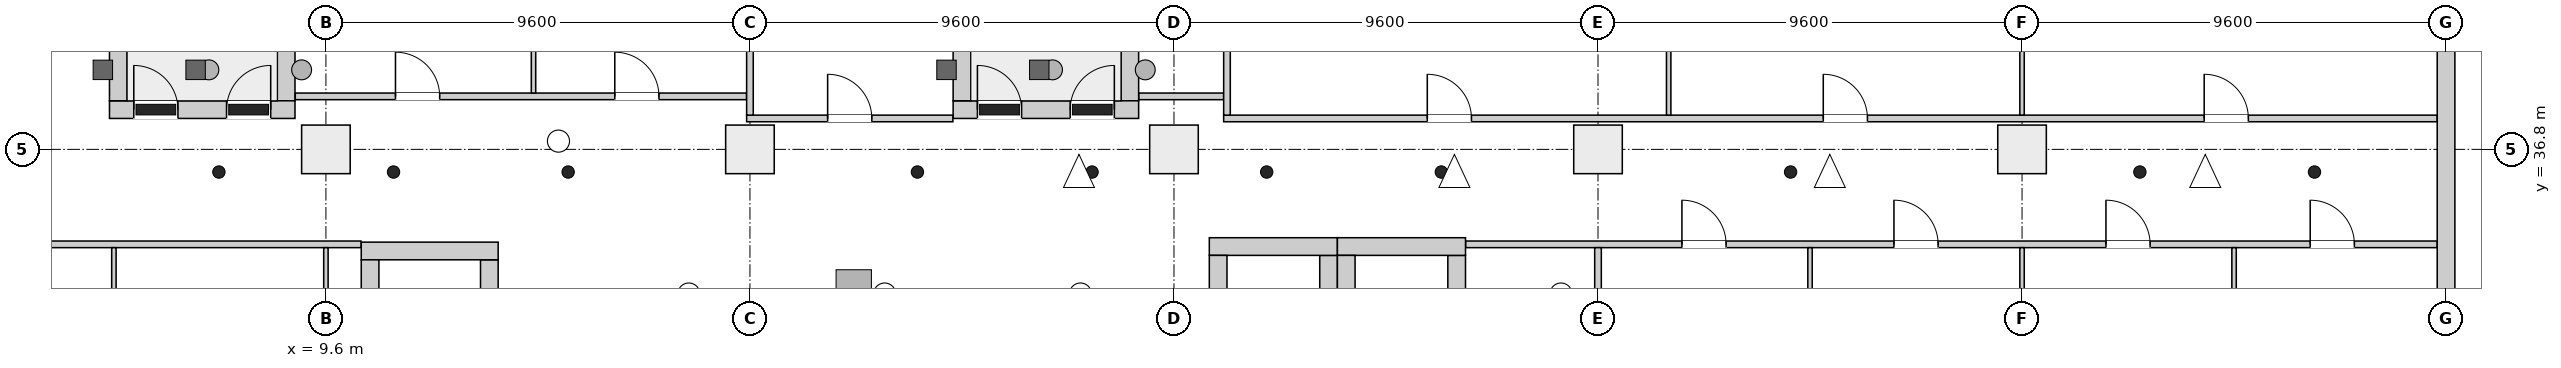
"""IFC4 building model, lengths in metres.
Left out: names, types, materials, properties, quantities, classifications, styles, units other than length and angle.
Written with IfcOpenShell. Run it as: python <this file> out.ifc"""

import sys

from ifc_helpers import new_model, si_unit, direction, frame, frame_2d, origin, origin_2d, place, context, subcontext, project, spatial, rectangle, extrude, element, fill, save


model = new_model("IFC4")
c1 = context("Model", 3, precision=1e-05, world=origin(), true_north=direction((0.0, 1.0)))
c2 = subcontext(c1, "Body", "Model", "MODEL_VIEW")
j1 = project(units=[si_unit("LENGTHUNIT", "METRE"), si_unit("PLANEANGLEUNIT", "RADIAN")], contexts=[c1])
p1 = place(None, origin())
s1 = spatial("IfcSite", under=j1, at=p1, CompositionType="ELEMENT")
p2 = place(p1, origin())
s2 = spatial("IfcBuilding", under=s1, at=p2, CompositionType="ELEMENT")
p3 = place(p2, frame((0.0, 0.0, 26.7)))
s3 = spatial("IfcBuildingStorey", under=s2, at=p3, CompositionType="ELEMENT", Elevation=26.7)
p4 = place(p3, frame((57.6, -0.2, 0.0), z_axis=(0.0, 0.0, 1.0), x_axis=(0.0, 1.0, 0.0)))
e1 = element("IfcWall", 1, at=p4, inside=s3, PredefinedType="SHEAR", context=c2, shape_type="SweptSolid", body=[
    extrude(rectangle(XDim=46.88, YDim=0.4, at=frame_2d((23.44, 0.0))), origin(), (0.0, 0.0, 1.0), 5.2),
])
p5 = place(p3, frame((4.7, 37.7, 0.0), z_axis=(0.0, 0.0, 1.0), x_axis=(1.0, 0.0, 0.0)))
e2 = element("IfcWall", 2, at=p5, inside=s3, PredefinedType="SHEAR", context=c2, shape_type="SweptSolid", body=[
    extrude(rectangle(XDim=4.2, YDim=0.4, at=frame_2d((2.1, 0.0))), origin(), (0.0, 0.0, 1.0), 5.2),
])
p6 = place(p5, frame((0.55, 0.0, 0.0)))
e3 = element("IfcOpeningElement", 3, at=p6, cuts=e2, PredefinedType="OPENING", context=c2, shape_type="SweptSolid", body=[
    extrude(rectangle(XDim=1.0, YDim=2.1, at=frame_2d((0.5, 1.05))), frame((0.0, 0.21, 0.0), z_axis=(0.0, -1.0, 0.0), x_axis=(1.0, 0.0, 0.0)), (0.0, 0.0, 1.0), 0.42),
])
p7 = place(p5, frame((2.65, 0.0, 0.0)))
e4 = element("IfcOpeningElement", 4, at=p7, cuts=e2, PredefinedType="OPENING", context=c2, shape_type="SweptSolid", body=[
    extrude(rectangle(XDim=1.0, YDim=2.1, at=frame_2d((0.5, 1.05))), frame((0.0, 0.21, 0.0), z_axis=(0.0, -1.0, 0.0), x_axis=(1.0, 0.0, 0.0)), (0.0, 0.0, 1.0), 0.42),
])
for number, where, z_axis, x_axis in (
    (5, (4.9, 37.9, 0.0), (0.0, 0.0, 1.0), (0.0, 1.0, 0.0)),
    (6, (8.7, 37.9, 0.0), (0.0, 0.0, 1.0), (0.0, 1.0, 0.0)),
):
    element("IfcWall", number, at=place(p3, frame(where, z_axis=z_axis, x_axis=x_axis)), inside=s3, PredefinedType="SHEAR", context=c2, shape_type="SweptSolid", body=[
        extrude(rectangle(XDim=6.6, YDim=0.4, at=frame_2d((3.3, 0.0))), origin(), (0.0, 0.0, 1.0), 5.2),
    ])
p8 = place(p3, frame((23.8, 37.7, 0.0), z_axis=(0.0, 0.0, 1.0), x_axis=(1.0, 0.0, 0.0)))
e7 = element("IfcWall", 7, at=p8, inside=s3, PredefinedType="SHEAR", context=c2, shape_type="SweptSolid", body=[
    extrude(rectangle(XDim=4.2, YDim=0.4, at=frame_2d((2.1, 0.0))), origin(), (0.0, 0.0, 1.0), 5.2),
])
p9 = place(p8, frame((0.55, 0.0, 0.0)))
e8 = element("IfcOpeningElement", 8, at=p9, cuts=e7, PredefinedType="OPENING", context=c2, shape_type="SweptSolid", body=[
    extrude(rectangle(XDim=1.0, YDim=2.1, at=frame_2d((0.5, 1.05))), frame((0.0, 0.21, 0.0), z_axis=(0.0, -1.0, 0.0), x_axis=(1.0, 0.0, 0.0)), (0.0, 0.0, 1.0), 0.42),
])
p10 = place(p8, frame((2.65, 0.0, 0.0)))
e9 = element("IfcOpeningElement", 9, at=p10, cuts=e7, PredefinedType="OPENING", context=c2, shape_type="SweptSolid", body=[
    extrude(rectangle(XDim=1.0, YDim=2.1, at=frame_2d((0.5, 1.05))), frame((0.0, 0.21, 0.0), z_axis=(0.0, -1.0, 0.0), x_axis=(1.0, 0.0, 0.0)), (0.0, 0.0, 1.0), 0.42),
])
for number, where, z_axis, x_axis in (
    (10, (24.0, 37.9, 0.0), (0.0, 0.0, 1.0), (0.0, 1.0, 0.0)),
    (11, (27.8, 37.9, 0.0), (0.0, 0.0, 1.0), (0.0, 1.0, 0.0)),
):
    element("IfcWall", number, at=place(p3, frame(where, z_axis=z_axis, x_axis=x_axis)), inside=s3, PredefinedType="SHEAR", context=c2, shape_type="SweptSolid", body=[
        extrude(rectangle(XDim=6.6, YDim=0.4, at=frame_2d((3.3, 0.0))), origin(), (0.0, 0.0, 1.0), 5.2),
    ])
p11 = place(p3, frame((10.4, 34.5, 0.0), z_axis=(0.0, 0.0, 1.0), x_axis=(1.0, 0.0, 0.0)))
e12 = element("IfcWall", 12, at=p11, inside=s3, PredefinedType="SHEAR", context=c2, shape_type="SweptSolid", body=[
    extrude(rectangle(XDim=3.1, YDim=0.4, at=frame_2d((1.55, 0.0))), origin(), (0.0, 0.0, 1.0), 5.2),
])
for number, where, z_axis, x_axis in (
    (13, (10.6, 30.9, 0.0), (0.0, 0.0, 1.0), (0.0, 1.0, 0.0)),
    (14, (13.3, 30.9, 0.0), (0.0, 0.0, 1.0), (0.0, 1.0, 0.0)),
):
    element("IfcWall", number, at=place(p3, frame(where, z_axis=z_axis, x_axis=x_axis)), inside=s3, PredefinedType="SHEAR", context=c2, shape_type="SweptSolid", body=[
        extrude(rectangle(XDim=3.4, YDim=0.4, at=frame_2d((1.7, 0.0))), origin(), (0.0, 0.0, 1.0), 5.2),
    ])
p12 = place(p3, frame((29.6, 34.6, 0.0), z_axis=(0.0, 0.0, 1.0), x_axis=(1.0, 0.0, 0.0)))
e15 = element("IfcWall", 15, at=p12, inside=s3, PredefinedType="SHEAR", context=c2, shape_type="SweptSolid", body=[
    extrude(rectangle(XDim=2.9, YDim=0.4, at=frame_2d((1.45, 0.0))), origin(), (0.0, 0.0, 1.0), 5.2),
])
for number, where, z_axis, x_axis in (
    (16, (29.8, 31.4, 0.0), (0.0, 0.0, 1.0), (0.0, 1.0, 0.0)),
    (17, (32.3, 31.4, 0.0), (0.0, 0.0, 1.0), (0.0, 1.0, 0.0)),
):
    element("IfcWall", number, at=place(p3, frame(where, z_axis=z_axis, x_axis=x_axis)), inside=s3, PredefinedType="SHEAR", context=c2, shape_type="SweptSolid", body=[
        extrude(rectangle(XDim=3.0, YDim=0.4, at=frame_2d((1.5, 0.0))), origin(), (0.0, 0.0, 1.0), 5.2),
    ])
p13 = place(p3, frame((32.5, 34.6, 0.0), z_axis=(0.0, 0.0, 1.0), x_axis=(1.0, 0.0, 0.0)))
e18 = element("IfcWall", 18, at=p13, inside=s3, PredefinedType="SHEAR", context=c2, shape_type="SweptSolid", body=[
    extrude(rectangle(XDim=2.9, YDim=0.4, at=frame_2d((1.45, 0.0))), origin(), (0.0, 0.0, 1.0), 5.2),
])
for number, where, z_axis, x_axis in (
    (19, (32.7, 31.4, 0.0), (0.0, 0.0, 1.0), (0.0, 1.0, 0.0)),
    (20, (35.2, 31.4, 0.0), (0.0, 0.0, 1.0), (0.0, 1.0, 0.0)),
):
    element("IfcWall", number, at=place(p3, frame(where, z_axis=z_axis, x_axis=x_axis)), inside=s3, PredefinedType="SHEAR", context=c2, shape_type="SweptSolid", body=[
        extrude(rectangle(XDim=3.0, YDim=0.4, at=frame_2d((1.5, 0.0))), origin(), (0.0, 0.0, 1.0), 5.2),
    ])
for number, where, z_axis, x_axis in (
    (21, (9.6, 36.8, 0.0), (0.0, 0.0, 1.0), (1.0, 0.0, 0.0)),
    (22, (19.2, 36.8, 0.0), (0.0, 0.0, 1.0), (1.0, 0.0, 0.0)),
    (23, (28.8, 36.8, 0.0), (0.0, 0.0, 1.0), (1.0, 0.0, 0.0)),
    (24, (38.4, 36.8, 0.0), (0.0, 0.0, 1.0), (1.0, 0.0, 0.0)),
    (25, (48.0, 36.8, 0.0), (0.0, 0.0, 1.0), (1.0, 0.0, 0.0)),
):
    element("IfcColumn", number, at=place(p3, frame(where, z_axis=z_axis, x_axis=x_axis)), inside=s3, PredefinedType="COLUMN", context=c2, shape_type="SweptSolid", body=[
        extrude(rectangle(XDim=1.1, YDim=1.1, at=origin_2d()), origin(), (0.0, 0.0, 1.0), 5.2),
    ])
p14 = place(p3, frame((2.706, 34.65, 0.0), z_axis=(0.0, 0.0, 1.0), x_axis=(1.0, 0.0, 0.0)))
e26 = element("IfcWall", 26, at=p14, inside=s3, PredefinedType="PARTITIONING", context=c2, shape_type="SweptSolid", body=[
    extrude(rectangle(XDim=7.688, YDim=0.15, at=frame_2d((3.844, 0.0))), origin(), (0.0, 0.0, 1.0), 4.85),
])
p15 = place(p3, frame((4.8, 25.175, 0.0), z_axis=(0.0, 0.0, 1.0), x_axis=(0.0, 1.0, 0.0)))
e27 = element("IfcWall", 27, at=p15, inside=s3, PredefinedType="PARTITIONING", context=c2, shape_type="SweptSolid", body=[
    extrude(rectangle(XDim=9.4, YDim=0.1, at=frame_2d((4.7, 0.0))), origin(), (0.0, 0.0, 1.0), 4.85),
])
p16 = place(p3, frame((8.906, 38.0, 0.0), z_axis=(0.0, 0.0, 1.0), x_axis=(1.0, 0.0, 0.0)))
e28 = element("IfcWall", 28, at=p16, inside=s3, PredefinedType="PARTITIONING", context=c2, shape_type="SweptSolid", body=[
    extrude(rectangle(XDim=10.219, YDim=0.15, at=frame_2d((5.109, 0.0))), origin(), (0.0, 0.0, 1.0), 4.85),
])
p17 = place(p16, frame((2.269, 0.0, 0.0)))
e29 = element("IfcOpeningElement", 29, at=p17, cuts=e28, PredefinedType="OPENING", context=c2, shape_type="SweptSolid", body=[
    extrude(rectangle(XDim=1.0, YDim=2.1, at=frame_2d((0.5, 1.05))), frame((0.0, 0.085, 0.0), z_axis=(0.0, -1.0, 0.0), x_axis=(1.0, 0.0, 0.0)), (0.0, 0.0, 1.0), 0.17),
])
p18 = place(p16, frame((7.234, 0.0, 0.0)))
e30 = element("IfcOpeningElement", 30, at=p18, cuts=e28, PredefinedType="OPENING", context=c2, shape_type="SweptSolid", body=[
    extrude(rectangle(XDim=1.0, YDim=2.1, at=frame_2d((0.5, 1.05))), frame((0.0, 0.085, 0.0), z_axis=(0.0, -1.0, 0.0), x_axis=(1.0, 0.0, 0.0)), (0.0, 0.0, 1.0), 0.17),
])
p19 = place(p3, frame((9.6, 31.075, 0.0), z_axis=(0.0, 0.0, 1.0), x_axis=(0.0, 1.0, 0.0)))
e31 = element("IfcWall", 31, at=p19, inside=s3, PredefinedType="PARTITIONING", context=c2, shape_type="SweptSolid", body=[
    extrude(rectangle(XDim=3.5, YDim=0.1, at=frame_2d((1.75, 0.0))), origin(), (0.0, 0.0, 1.0), 4.45),
])
p20 = place(p3, frame((14.3, 38.075, 0.0), z_axis=(0.0, 0.0, 1.0), x_axis=(0.0, 1.0, 0.0)))
e32 = element("IfcWall", 32, at=p20, inside=s3, PredefinedType="PARTITIONING", context=c2, shape_type="SweptSolid", body=[
    extrude(rectangle(XDim=5.7, YDim=0.1, at=frame_2d((2.85, 0.0))), origin(), (0.0, 0.0, 1.0), 4.85),
])
p21 = place(p3, frame((19.125, 37.5, 0.0), z_axis=(0.0, 0.0, 1.0), x_axis=(1.0, 0.0, 0.0)))
e33 = element("IfcWall", 33, at=p21, inside=s3, PredefinedType="PARTITIONING", context=c2, shape_type="SweptSolid", body=[
    extrude(rectangle(XDim=4.669, YDim=0.15, at=frame_2d((2.334, 0.0))), origin(), (0.0, 0.0, 1.0), 4.85),
])
p22 = place(p21, frame((1.834, 0.0, 0.0)))
e34 = element("IfcOpeningElement", 34, at=p22, cuts=e33, PredefinedType="OPENING", context=c2, shape_type="SweptSolid", body=[
    extrude(rectangle(XDim=1.0, YDim=2.1, at=frame_2d((0.5, 1.05))), frame((0.0, 0.085, 0.0), z_axis=(0.0, -1.0, 0.0), x_axis=(1.0, 0.0, 0.0)), (0.0, 0.0, 1.0), 0.17),
])
p23 = place(p3, frame((19.2, 37.575, 0.0), z_axis=(0.0, 0.0, 1.0), x_axis=(0.0, 1.0, 0.0)))
e35 = element("IfcWall", 35, at=p23, inside=s3, PredefinedType="PARTITIONING", context=c2, shape_type="SweptSolid", body=[
    extrude(rectangle(XDim=6.2, YDim=0.15, at=frame_2d((3.1, 0.0))), origin(), (0.0, 0.0, 1.0), 4.45),
])
p24 = place(p3, frame((28.006, 38.0, 0.0), z_axis=(0.0, 0.0, 1.0), x_axis=(1.0, 0.0, 0.0)))
e36 = element("IfcWall", 36, at=p24, inside=s3, PredefinedType="PARTITIONING", context=c2, shape_type="SweptSolid", body=[
    extrude(rectangle(XDim=1.919, YDim=0.15, at=frame_2d((0.959, 0.0))), origin(), (0.0, 0.0, 1.0), 4.85),
])
p25 = place(p3, frame((29.925, 37.5, 0.0), z_axis=(0.0, 0.0, 1.0), x_axis=(1.0, 0.0, 0.0)))
e37 = element("IfcWall", 37, at=p25, inside=s3, PredefinedType="PARTITIONING", context=c2, shape_type="SweptSolid", body=[
    extrude(rectangle(XDim=27.469, YDim=0.15, at=frame_2d((13.734, 0.0))), origin(), (0.0, 0.0, 1.0), 4.85),
])
p26 = place(p25, frame((4.61, 0.0, 0.0)))
e38 = element("IfcOpeningElement", 38, at=p26, cuts=e37, PredefinedType="OPENING", context=c2, shape_type="SweptSolid", body=[
    extrude(rectangle(XDim=1.0, YDim=2.1, at=frame_2d((0.5, 1.05))), frame((0.0, 0.085, 0.0), z_axis=(0.0, -1.0, 0.0), x_axis=(1.0, 0.0, 0.0)), (0.0, 0.0, 1.0), 0.17),
])
p27 = place(p25, frame((13.575, 0.0, 0.0)))
e39 = element("IfcOpeningElement", 39, at=p27, cuts=e37, PredefinedType="OPENING", context=c2, shape_type="SweptSolid", body=[
    extrude(rectangle(XDim=1.0, YDim=2.1, at=frame_2d((0.5, 1.05))), frame((0.0, 0.085, 0.0), z_axis=(0.0, -1.0, 0.0), x_axis=(1.0, 0.0, 0.0)), (0.0, 0.0, 1.0), 0.17),
])
p28 = place(p25, frame((22.199, 0.0, 0.0)))
e40 = element("IfcOpeningElement", 40, at=p28, cuts=e37, PredefinedType="OPENING", context=c2, shape_type="SweptSolid", body=[
    extrude(rectangle(XDim=1.0, YDim=2.1, at=frame_2d((0.5, 1.05))), frame((0.0, 0.085, 0.0), z_axis=(0.0, -1.0, 0.0), x_axis=(1.0, 0.0, 0.0)), (0.0, 0.0, 1.0), 0.17),
])
p29 = place(p3, frame((30.0, 37.575, 0.0), z_axis=(0.0, 0.0, 1.0), x_axis=(0.0, 1.0, 0.0)))
e41 = element("IfcWall", 41, at=p29, inside=s3, PredefinedType="PARTITIONING", context=c2, shape_type="SweptSolid", body=[
    extrude(rectangle(XDim=6.2, YDim=0.15, at=frame_2d((3.1, 0.0))), origin(), (0.0, 0.0, 1.0), 4.85),
])
p30 = place(p3, frame((35.406, 34.65, 0.0), z_axis=(0.0, 0.0, 1.0), x_axis=(1.0, 0.0, 0.0)))
e42 = element("IfcWall", 42, at=p30, inside=s3, PredefinedType="PARTITIONING", context=c2, shape_type="SweptSolid", body=[
    extrude(rectangle(XDim=21.988, YDim=0.15, at=frame_2d((10.994, 0.0))), origin(), (0.0, 0.0, 1.0), 4.85),
])
p31 = place(p30, frame((4.894, 0.0, 0.0)))
e43 = element("IfcOpeningElement", 43, at=p31, cuts=e42, PredefinedType="OPENING", context=c2, shape_type="SweptSolid", body=[
    extrude(rectangle(XDim=1.0, YDim=2.1, at=frame_2d((0.5, 1.05))), frame((0.0, 0.085, 0.0), z_axis=(0.0, -1.0, 0.0), x_axis=(1.0, 0.0, 0.0)), (0.0, 0.0, 1.0), 0.17),
])
p32 = place(p30, frame((9.694, 0.0, 0.0)))
e44 = element("IfcOpeningElement", 44, at=p32, cuts=e42, PredefinedType="OPENING", context=c2, shape_type="SweptSolid", body=[
    extrude(rectangle(XDim=1.0, YDim=2.1, at=frame_2d((0.5, 1.05))), frame((0.0, 0.085, 0.0), z_axis=(0.0, -1.0, 0.0), x_axis=(1.0, 0.0, 0.0)), (0.0, 0.0, 1.0), 0.17),
])
p33 = place(p30, frame((14.494, 0.0, 0.0)))
e45 = element("IfcOpeningElement", 45, at=p33, cuts=e42, PredefinedType="OPENING", context=c2, shape_type="SweptSolid", body=[
    extrude(rectangle(XDim=1.0, YDim=2.1, at=frame_2d((0.5, 1.05))), frame((0.0, 0.085, 0.0), z_axis=(0.0, -1.0, 0.0), x_axis=(1.0, 0.0, 0.0)), (0.0, 0.0, 1.0), 0.17),
])
p34 = place(p30, frame((19.118, 0.0, 0.0)))
e46 = element("IfcOpeningElement", 46, at=p34, cuts=e42, PredefinedType="OPENING", context=c2, shape_type="SweptSolid", body=[
    extrude(rectangle(XDim=1.0, YDim=2.1, at=frame_2d((0.5, 1.05))), frame((0.0, 0.085, 0.0), z_axis=(0.0, -1.0, 0.0), x_axis=(1.0, 0.0, 0.0)), (0.0, 0.0, 1.0), 0.17),
])
p35 = place(p3, frame((38.4, 28.15, 0.0), z_axis=(0.0, 0.0, 1.0), x_axis=(0.0, 1.0, 0.0)))
e47 = element("IfcWall", 47, at=p35, inside=s3, PredefinedType="PARTITIONING", context=c2, shape_type="SweptSolid", body=[
    extrude(rectangle(XDim=6.425, YDim=0.15, at=frame_2d((3.212, 0.0))), origin(), (0.0, 0.0, 1.0), 4.45),
])
p36 = place(p3, frame((40.0, 37.575, 0.0), z_axis=(0.0, 0.0, 1.0), x_axis=(0.0, 1.0, 0.0)))
e48 = element("IfcWall", 48, at=p36, inside=s3, PredefinedType="PARTITIONING", context=c2, shape_type="SweptSolid", body=[
    extrude(rectangle(XDim=6.2, YDim=0.1, at=frame_2d((3.1, 0.0))), origin(), (0.0, 0.0, 1.0), 4.85),
])
p37 = place(p3, frame((43.2, 27.05, 0.0), z_axis=(0.0, 0.0, 1.0), x_axis=(0.0, 1.0, 0.0)))
e49 = element("IfcWall", 49, at=p37, inside=s3, PredefinedType="PARTITIONING", context=c2, shape_type="SweptSolid", body=[
    extrude(rectangle(XDim=7.525, YDim=0.1, at=frame_2d((3.762, 0.0))), origin(), (0.0, 0.0, 1.0), 4.85),
])
p38 = place(p3, frame((48.0, 28.15, 0.0), z_axis=(0.0, 0.0, 1.0), x_axis=(0.0, 1.0, 0.0)))
e50 = element("IfcWall", 50, at=p38, inside=s3, PredefinedType="PARTITIONING", context=c2, shape_type="SweptSolid", body=[
    extrude(rectangle(XDim=6.425, YDim=0.1, at=frame_2d((3.212, 0.0))), origin(), (0.0, 0.0, 1.0), 4.85),
])
p39 = place(p3, frame((48.0, 37.575, 0.0), z_axis=(0.0, 0.0, 1.0), x_axis=(0.0, 1.0, 0.0)))
e51 = element("IfcWall", 51, at=p39, inside=s3, PredefinedType="PARTITIONING", context=c2, shape_type="SweptSolid", body=[
    extrude(rectangle(XDim=6.2, YDim=0.1, at=frame_2d((3.1, 0.0))), origin(), (0.0, 0.0, 1.0), 4.85),
])
p40 = place(p3, frame((52.8, 27.05, 0.0), z_axis=(0.0, 0.0, 1.0), x_axis=(0.0, 1.0, 0.0)))
e52 = element("IfcWall", 52, at=p40, inside=s3, PredefinedType="PARTITIONING", context=c2, shape_type="SweptSolid", body=[
    extrude(rectangle(XDim=7.525, YDim=0.1, at=frame_2d((3.762, 0.0))), origin(), (0.0, 0.0, 1.0), 4.85),
])
p41 = place(p6, origin())
e53 = element("IfcDoor", 53, at=p41, inside=s3, OperationType="SINGLE_SWING_RIGHT", PredefinedType="DOOR", context=c2, shape_type="SweptSolid", body=[
    extrude(rectangle(XDim=1.0, YDim=2.1, at=frame_2d((0.5, 1.05))), frame((0.0, 0.025, 0.0), z_axis=(0.0, -1.0, 0.0), x_axis=(1.0, 0.0, 0.0)), (0.0, 0.0, 1.0), 0.05),
])
fill(e3, e53)
p42 = place(p7, origin())
e54 = element("IfcDoor", 54, at=p42, inside=s3, OperationType="SINGLE_SWING_LEFT", PredefinedType="DOOR", context=c2, shape_type="SweptSolid", body=[
    extrude(rectangle(XDim=1.0, YDim=2.1, at=frame_2d((0.5, 1.05))), frame((0.0, 0.025, 0.0), z_axis=(0.0, -1.0, 0.0), x_axis=(1.0, 0.0, 0.0)), (0.0, 0.0, 1.0), 0.05),
])
fill(e4, e54)
p43 = place(p9, origin())
e55 = element("IfcDoor", 55, at=p43, inside=s3, OperationType="SINGLE_SWING_RIGHT", PredefinedType="DOOR", context=c2, shape_type="SweptSolid", body=[
    extrude(rectangle(XDim=1.0, YDim=2.1, at=frame_2d((0.5, 1.05))), frame((0.0, 0.025, 0.0), z_axis=(0.0, -1.0, 0.0), x_axis=(1.0, 0.0, 0.0)), (0.0, 0.0, 1.0), 0.05),
])
fill(e8, e55)
p44 = place(p10, origin())
e56 = element("IfcDoor", 56, at=p44, inside=s3, OperationType="SINGLE_SWING_LEFT", PredefinedType="DOOR", context=c2, shape_type="SweptSolid", body=[
    extrude(rectangle(XDim=1.0, YDim=2.1, at=frame_2d((0.5, 1.05))), frame((0.0, 0.025, 0.0), z_axis=(0.0, -1.0, 0.0), x_axis=(1.0, 0.0, 0.0)), (0.0, 0.0, 1.0), 0.05),
])
fill(e9, e56)
p45 = place(p31, origin())
e57 = element("IfcDoor", 57, at=p45, inside=s3, OperationType="SINGLE_SWING_RIGHT", PredefinedType="DOOR", context=c2, shape_type="SweptSolid", body=[
    extrude(rectangle(XDim=1.0, YDim=2.1, at=frame_2d((0.5, 1.05))), frame((0.0, 0.025, 0.0), z_axis=(0.0, -1.0, 0.0), x_axis=(1.0, 0.0, 0.0)), (0.0, 0.0, 1.0), 0.05),
])
fill(e43, e57)
p46 = place(p32, origin())
e58 = element("IfcDoor", 58, at=p46, inside=s3, OperationType="SINGLE_SWING_RIGHT", PredefinedType="DOOR", context=c2, shape_type="SweptSolid", body=[
    extrude(rectangle(XDim=1.0, YDim=2.1, at=frame_2d((0.5, 1.05))), frame((0.0, 0.025, 0.0), z_axis=(0.0, -1.0, 0.0), x_axis=(1.0, 0.0, 0.0)), (0.0, 0.0, 1.0), 0.05),
])
fill(e44, e58)
p47 = place(p33, origin())
e59 = element("IfcDoor", 59, at=p47, inside=s3, OperationType="SINGLE_SWING_LEFT", PredefinedType="DOOR", context=c2, shape_type="SweptSolid", body=[
    extrude(rectangle(XDim=1.0, YDim=2.1, at=frame_2d((0.5, 1.05))), frame((0.0, 0.025, 0.0), z_axis=(0.0, -1.0, 0.0), x_axis=(1.0, 0.0, 0.0)), (0.0, 0.0, 1.0), 0.05),
])
fill(e45, e59)
p48 = place(p34, origin())
e60 = element("IfcDoor", 60, at=p48, inside=s3, OperationType="SINGLE_SWING_LEFT", PredefinedType="DOOR", context=c2, shape_type="SweptSolid", body=[
    extrude(rectangle(XDim=1.0, YDim=2.1, at=frame_2d((0.5, 1.05))), frame((0.0, 0.025, 0.0), z_axis=(0.0, -1.0, 0.0), x_axis=(1.0, 0.0, 0.0)), (0.0, 0.0, 1.0), 0.05),
])
fill(e46, e60)
p49 = place(p26, origin())
e61 = element("IfcDoor", 61, at=p49, inside=s3, OperationType="SINGLE_SWING_LEFT", PredefinedType="DOOR", context=c2, shape_type="SweptSolid", body=[
    extrude(rectangle(XDim=1.0, YDim=2.1, at=frame_2d((0.5, 1.05))), frame((0.0, 0.025, 0.0), z_axis=(0.0, -1.0, 0.0), x_axis=(1.0, 0.0, 0.0)), (0.0, 0.0, 1.0), 0.05),
])
fill(e38, e61)
p50 = place(p27, origin())
e62 = element("IfcDoor", 62, at=p50, inside=s3, OperationType="SINGLE_SWING_RIGHT", PredefinedType="DOOR", context=c2, shape_type="SweptSolid", body=[
    extrude(rectangle(XDim=1.0, YDim=2.1, at=frame_2d((0.5, 1.05))), frame((0.0, 0.025, 0.0), z_axis=(0.0, -1.0, 0.0), x_axis=(1.0, 0.0, 0.0)), (0.0, 0.0, 1.0), 0.05),
])
fill(e39, e62)
p51 = place(p28, origin())
e63 = element("IfcDoor", 63, at=p51, inside=s3, OperationType="SINGLE_SWING_RIGHT", PredefinedType="DOOR", context=c2, shape_type="SweptSolid", body=[
    extrude(rectangle(XDim=1.0, YDim=2.1, at=frame_2d((0.5, 1.05))), frame((0.0, 0.025, 0.0), z_axis=(0.0, -1.0, 0.0), x_axis=(1.0, 0.0, 0.0)), (0.0, 0.0, 1.0), 0.05),
])
fill(e40, e63)
p52 = place(p22, origin())
e64 = element("IfcDoor", 64, at=p52, inside=s3, OperationType="SINGLE_SWING_LEFT", PredefinedType="DOOR", context=c2, shape_type="SweptSolid", body=[
    extrude(rectangle(XDim=1.0, YDim=2.1, at=frame_2d((0.5, 1.05))), frame((0.0, 0.025, 0.0), z_axis=(0.0, -1.0, 0.0), x_axis=(1.0, 0.0, 0.0)), (0.0, 0.0, 1.0), 0.05),
])
fill(e34, e64)
p53 = place(p17, origin())
e65 = element("IfcDoor", 65, at=p53, inside=s3, OperationType="SINGLE_SWING_LEFT", PredefinedType="DOOR", context=c2, shape_type="SweptSolid", body=[
    extrude(rectangle(XDim=1.0, YDim=2.1, at=frame_2d((0.5, 1.05))), frame((0.0, 0.025, 0.0), z_axis=(0.0, -1.0, 0.0), x_axis=(1.0, 0.0, 0.0)), (0.0, 0.0, 1.0), 0.05),
])
fill(e29, e65)
p54 = place(p18, origin())
e66 = element("IfcDoor", 66, at=p54, inside=s3, OperationType="SINGLE_SWING_RIGHT", PredefinedType="DOOR", context=c2, shape_type="SweptSolid", body=[
    extrude(rectangle(XDim=1.0, YDim=2.1, at=frame_2d((0.5, 1.05))), frame((0.0, 0.025, 0.0), z_axis=(0.0, -1.0, 0.0), x_axis=(1.0, 0.0, 0.0)), (0.0, 0.0, 1.0), 0.05),
])
fill(e30, e66)
save(model, sys.argv[1])
